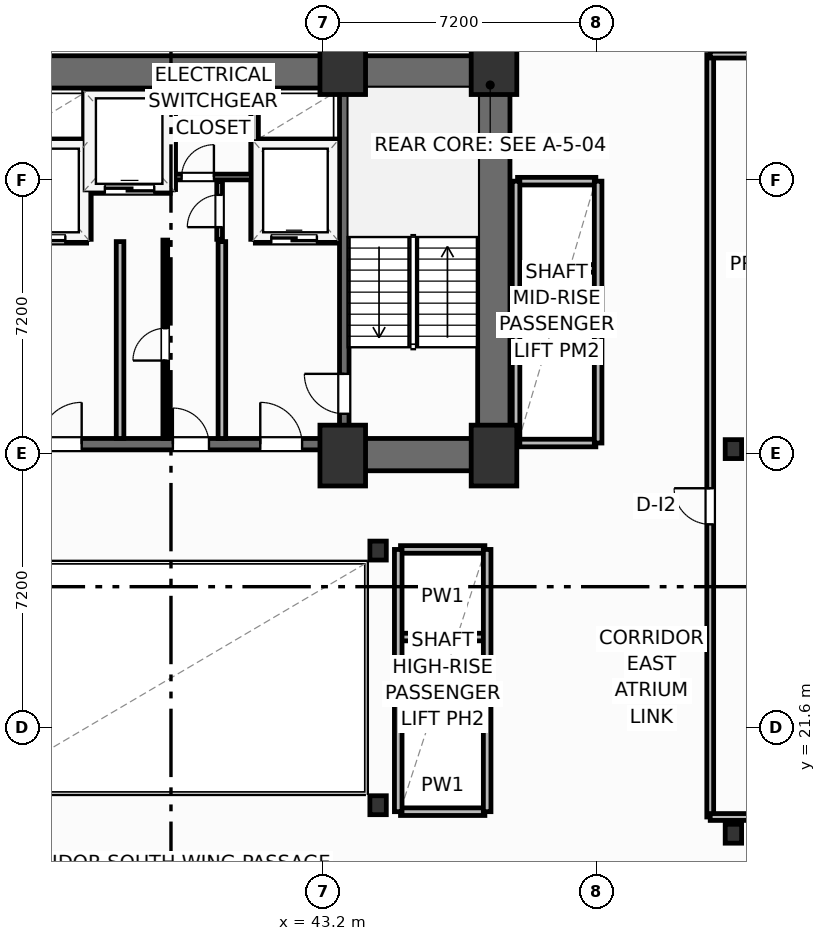
"""IFC4 building model, lengths in metres.
Left out: names, types, materials, properties, quantities, classifications, styles, units other than length and angle.
Written with IfcOpenShell. Run it as: python <this file> out.ifc"""

import sys

from ifc_helpers import new_model, si_unit, direction, frame, frame_2d, origin, origin_2d, place, context, subcontext, project, spatial, rectangle, i_section, extrude, element, fill, save


model = new_model("IFC4")
c1 = context("Model", 3, precision=1e-05, world=origin(), true_north=direction((0.0, 1.0)))
c2 = subcontext(c1, "Body", "Model", "MODEL_VIEW")
j1 = project(units=[si_unit("LENGTHUNIT", "METRE"), si_unit("PLANEANGLEUNIT", "RADIAN")], contexts=[c1])
p1 = place(None, origin())
s1 = spatial("IfcSite", under=j1, at=p1, CompositionType="ELEMENT")
p2 = place(p1, origin())
s2 = spatial("IfcBuilding", under=s1, at=p2, CompositionType="ELEMENT")
p3 = place(p2, frame((0.0, 0.0, 49.2)))
s3 = spatial("IfcBuildingStorey", under=s2, at=p3, CompositionType="ELEMENT", Elevation=49.2)
for number, where, z_axis, x_axis in (
    (1, (43.72, 28.75, 0.0), (0.0, 0.0, 1.0), (1.0, 0.0, 0.0)),
    (2, (47.7, 28.75, 0.0), (0.0, 0.0, 1.0), (1.0, 0.0, 0.0)),
    (3, (43.72, 39.05, 0.0), (0.0, 0.0, 1.0), (1.0, 0.0, 0.0)),
    (4, (47.7, 39.05, 0.0), (0.0, 0.0, 1.0), (1.0, 0.0, 0.0)),
):
    element("IfcColumn", number, at=place(p3, frame(where, z_axis=z_axis, x_axis=x_axis)), inside=s3, PredefinedType="COLUMN", context=c2, shape_type="SweptSolid", body=[
        extrude(rectangle(XDim=1.2, YDim=1.6, at=origin_2d()), origin(), (0.0, 0.0, 1.0), 3.7),
    ])
for number, where, z_axis, x_axis in (
    (5, (44.65, 19.55, 0.0), (0.0, 0.0, 1.0), (1.0, 0.0, 0.0)),
    (6, (44.65, 26.25, 0.0), (0.0, 0.0, 1.0), (1.0, 0.0, 0.0)),
    (7, (54.0, 18.8, 0.0), (0.0, 0.0, 1.0), (1.0, 0.0, 0.0)),
    (8, (54.0, 28.92, 0.0), (0.0, 0.0, 1.0), (1.0, 0.0, 0.0)),
):
    element("IfcColumn", number, at=place(p3, frame(where, z_axis=z_axis, x_axis=x_axis)), inside=s3, PredefinedType="COLUMN", context=c2, shape_type="SweptSolid", body=[
        extrude(i_section(OverallWidth=0.432, OverallDepth=0.498, WebThickness=0.056, FlangeThickness=0.089, FilletRadius=0.025, at=origin_2d()), origin(), (0.0, 0.0, 1.0), 3.7),
    ])
p4 = place(p3, frame((30.28, 38.845, 0.0), z_axis=(0.0, 0.0, 1.0), x_axis=(1.0, 0.0, 0.0)))
e9 = element("IfcWall", 9, at=p4, inside=s3, PredefinedType="SHEAR", context=c2, shape_type="SweptSolid", body=[
    extrude(rectangle(XDim=17.84, YDim=0.85, at=frame_2d((8.92, 0.0))), origin(), (0.0, 0.0, 1.0), 3.45),
])
p5 = place(p3, frame((47.695, 29.2, 0.0), z_axis=(0.0, 0.0, 1.0), x_axis=(0.0, 1.0, 0.0)))
e10 = element("IfcWall", 10, at=p5, inside=s3, PredefinedType="SHEAR", context=c2, shape_type="SweptSolid", body=[
    extrude(rectangle(XDim=9.22, YDim=0.85, at=frame_2d((4.61, 0.0))), origin(), (0.0, 0.0, 1.0), 3.45),
])
p6 = place(p3, frame((43.6, 28.775, 0.0), z_axis=(0.0, 0.0, 1.0), x_axis=(1.0, 0.0, 0.0)))
e11 = element("IfcWall", 11, at=p6, inside=s3, PredefinedType="SHEAR", context=c2, shape_type="SweptSolid", body=[
    extrude(rectangle(XDim=4.52, YDim=0.85, at=frame_2d((2.26, 0.0))), origin(), (0.0, 0.0, 1.0), 3.45),
])
p7 = place(p3, frame((34.8, 29.05, 0.0), z_axis=(0.0, 0.0, 1.0), x_axis=(1.0, 0.0, 0.0)))
e12 = element("IfcWall", 12, at=p7, inside=s3, PredefinedType="SHEAR", context=c2, shape_type="SweptSolid", body=[
    extrude(rectangle(XDim=8.8, YDim=0.3, at=frame_2d((4.4, 0.0))), origin(), (0.0, 0.0, 1.0), 3.45),
])
p8 = place(p7, frame((0.95, 0.0, 0.0)))
e13 = element("IfcOpeningElement", 13, at=p8, cuts=e12, PredefinedType="OPENING", context=c2, shape_type="SweptSolid", body=[
    extrude(rectangle(XDim=1.1, YDim=2.15, at=frame_2d((0.55, 1.075))), frame((0.0, 0.16, 0.0), z_axis=(0.0, -1.0, 0.0), x_axis=(1.0, 0.0, 0.0)), (0.0, 0.0, 1.0), 0.32),
])
p9 = place(p7, frame((6.75, 0.0, 0.0)))
e14 = element("IfcOpeningElement", 14, at=p9, cuts=e12, PredefinedType="OPENING", context=c2, shape_type="SweptSolid", body=[
    extrude(rectangle(XDim=1.1, YDim=2.15, at=frame_2d((0.55, 1.075))), frame((0.0, 0.16, 0.0), z_axis=(0.0, -1.0, 0.0), x_axis=(1.0, 0.0, 0.0)), (0.0, 0.0, 1.0), 0.32),
])
p10 = place(p7, frame((4.45, 0.0, 0.0)))
e15 = element("IfcOpeningElement", 15, at=p10, cuts=e12, PredefinedType="OPENING", context=c2, shape_type="SweptSolid", body=[
    extrude(rectangle(XDim=0.95, YDim=2.15, at=frame_2d((0.475, 1.075))), frame((0.0, 0.16, 0.0), z_axis=(0.0, -1.0, 0.0), x_axis=(1.0, 0.0, 0.0)), (0.0, 0.0, 1.0), 0.32),
])
p11 = place(p3, frame((43.76, 29.2, 0.0), z_axis=(0.0, 0.0, 1.0), x_axis=(0.0, 1.0, 0.0)))
e16 = element("IfcWall", 16, at=p11, inside=s3, PredefinedType="SHEAR", context=c2, shape_type="SweptSolid", body=[
    extrude(rectangle(XDim=9.22, YDim=0.25, at=frame_2d((4.61, 0.0))), origin(), (0.0, 0.0, 1.0), 3.45),
])
p12 = place(p11, frame((0.65, 0.0, 0.0)))
e17 = element("IfcOpeningElement", 17, at=p12, cuts=e16, PredefinedType="OPENING", context=c2, shape_type="SweptSolid", body=[
    extrude(rectangle(XDim=1.05, YDim=2.15, at=frame_2d((0.525, 1.075))), frame((0.0, 0.135, 0.0), z_axis=(0.0, -1.0, 0.0), x_axis=(1.0, 0.0, 0.0)), (0.0, 0.0, 1.0), 0.27),
])
p13 = place(p3, frame((53.39, 19.24, 0.0), z_axis=(0.0, 0.0, 1.0), x_axis=(0.0, 1.0, 0.0)))
e18 = element("IfcWall", 18, at=p13, inside=s3, PredefinedType="PARTITIONING", context=c2, shape_type="SweptSolid", body=[
    extrude(rectangle(XDim=20.06, YDim=0.18, at=frame_2d((10.03, 0.0))), origin(), (0.0, 0.0, 1.0), 3.45),
])
p14 = place(p13, frame((7.7, 0.0, 0.0)))
e19 = element("IfcOpeningElement", 19, at=p14, cuts=e18, PredefinedType="OPENING", context=c2, shape_type="SweptSolid", body=[
    extrude(rectangle(XDim=0.95, YDim=2.05, at=frame_2d((0.475, 1.025))), frame((0.0, 0.1, 0.0), z_axis=(0.0, -1.0, 0.0), x_axis=(1.0, 0.0, 0.0)), (0.0, 0.0, 1.0), 0.2),
])
p15 = place(p3, frame((53.39, 19.24, 0.0), z_axis=(0.0, 0.0, 1.0), x_axis=(1.0, 0.0, 0.0)))
e20 = element("IfcWall", 20, at=p15, inside=s3, PredefinedType="PARTITIONING", context=c2, shape_type="SweptSolid", body=[
    extrude(rectangle(XDim=23.61, YDim=0.18, at=frame_2d((11.805, 0.0))), origin(), (0.0, 0.0, 1.0), 3.45),
])
p16 = place(p3, frame((53.39, 39.3, 0.0), z_axis=(0.0, 0.0, 1.0), x_axis=(1.0, 0.0, 0.0)))
e21 = element("IfcWall", 21, at=p16, inside=s3, PredefinedType="PARTITIONING", context=c2, shape_type="SweptSolid", body=[
    extrude(rectangle(XDim=6.136, YDim=0.18, at=frame_2d((3.068, 0.0))), origin(), (0.0, 0.0, 1.0), 3.45),
])
for number, where, z_axis, x_axis in (
    (22, (37.86, 29.2, 0.0), (0.0, 0.0, 1.0), (0.0, 1.0, 0.0)),
    (23, (40.54, 29.2, 0.0), (0.0, 0.0, 1.0), (0.0, 1.0, 0.0)),
):
    element("IfcWall", number, at=place(p3, frame(where, z_axis=z_axis, x_axis=x_axis)), inside=s3, PredefinedType="PARTITIONING", context=c2, shape_type="SweptSolid", body=[
        extrude(rectangle(XDim=5.18, YDim=0.2, at=frame_2d((2.59, 0.0))), origin(), (0.0, 0.0, 1.0), 3.45),
    ])
p17 = place(p3, frame((34.8, 34.44, 0.0), z_axis=(0.0, 0.0, 1.0), x_axis=(1.0, 0.0, 0.0)))
e24 = element("IfcWall", 24, at=p17, inside=s3, PredefinedType="PARTITIONING", context=c2, shape_type="SweptSolid", body=[
    extrude(rectangle(XDim=2.18, YDim=0.2, at=frame_2d((1.09, 0.0))), origin(), (0.0, 0.0, 1.0), 3.45),
])
p18 = place(p17, frame((0.42, 0.0, 0.0)))
e25 = element("IfcOpeningElement", 25, at=p18, cuts=e24, PredefinedType="OPENING", context=c2, shape_type="SweptSolid", body=[
    extrude(rectangle(XDim=1.2, YDim=2.2, at=frame_2d((0.6, 1.1))), frame((0.0, 0.11, 0.0), z_axis=(0.0, -1.0, 0.0), x_axis=(1.0, 0.0, 0.0)), (0.0, 0.0, 1.0), 0.22),
])
p19 = place(p3, frame((34.8, 36.98, 0.0), z_axis=(0.0, 0.0, 1.0), x_axis=(1.0, 0.0, 0.0)))
e26 = element("IfcWall", 26, at=p19, inside=s3, PredefinedType="PARTITIONING", context=c2, shape_type="SweptSolid", body=[
    extrude(rectangle(XDim=2.18, YDim=0.2, at=frame_2d((1.09, 0.0))), origin(), (0.0, 0.0, 1.0), 3.45),
])
p20 = place(p3, frame((37.0, 34.44, 0.0), z_axis=(0.0, 0.0, 1.0), x_axis=(0.0, 1.0, 0.0)))
e27 = element("IfcWall", 27, at=p20, inside=s3, PredefinedType="PARTITIONING", context=c2, shape_type="SweptSolid", body=[
    extrude(rectangle(XDim=3.9, YDim=0.2, at=frame_2d((1.95, 0.0))), origin(), (0.0, 0.0, 1.0), 3.45),
])
p21 = place(p3, frame((41.42, 34.44, 0.0), z_axis=(0.0, 0.0, 1.0), x_axis=(1.0, 0.0, 0.0)))
e28 = element("IfcWall", 28, at=p21, inside=s3, PredefinedType="PARTITIONING", context=c2, shape_type="SweptSolid", body=[
    extrude(rectangle(XDim=2.18, YDim=0.2, at=frame_2d((1.09, 0.0))), origin(), (0.0, 0.0, 1.0), 3.45),
])
p22 = place(p21, frame((0.42, 0.0, 0.0)))
e29 = element("IfcOpeningElement", 29, at=p22, cuts=e28, PredefinedType="OPENING", context=c2, shape_type="SweptSolid", body=[
    extrude(rectangle(XDim=1.2, YDim=2.2, at=frame_2d((0.6, 1.1))), frame((0.0, 0.11, 0.0), z_axis=(0.0, -1.0, 0.0), x_axis=(1.0, 0.0, 0.0)), (0.0, 0.0, 1.0), 0.22),
])
p23 = place(p3, frame((41.42, 36.98, 0.0), z_axis=(0.0, 0.0, 1.0), x_axis=(1.0, 0.0, 0.0)))
e30 = element("IfcWall", 30, at=p23, inside=s3, PredefinedType="PARTITIONING", context=c2, shape_type="SweptSolid", body=[
    extrude(rectangle(XDim=2.18, YDim=0.2, at=frame_2d((1.09, 0.0))), origin(), (0.0, 0.0, 1.0), 3.45),
])
p24 = place(p3, frame((41.4, 34.44, 0.0), z_axis=(0.0, 0.0, 1.0), x_axis=(0.0, 1.0, 0.0)))
e31 = element("IfcWall", 31, at=p24, inside=s3, PredefinedType="PARTITIONING", context=c2, shape_type="SweptSolid", body=[
    extrude(rectangle(XDim=3.9, YDim=0.2, at=frame_2d((1.95, 0.0))), origin(), (0.0, 0.0, 1.0), 3.45),
])
p25 = place(p3, frame((37.06, 35.75, 0.0), z_axis=(0.0, 0.0, 1.0), x_axis=(1.0, 0.0, 0.0)))
e32 = element("IfcWall", 32, at=p25, inside=s3, PredefinedType="PARTITIONING", context=c2, shape_type="SweptSolid", body=[
    extrude(rectangle(XDim=2.12, YDim=0.2, at=frame_2d((1.06, 0.0))), origin(), (0.0, 0.0, 1.0), 3.45),
])
p26 = place(p25, frame((0.4, 0.0, 0.0)))
e33 = element("IfcOpeningElement", 33, at=p26, cuts=e32, PredefinedType="OPENING", context=c2, shape_type="SweptSolid", body=[
    extrude(rectangle(XDim=1.3, YDim=2.2, at=frame_2d((0.65, 1.1))), frame((0.0, 0.11, 0.0), z_axis=(0.0, -1.0, 0.0), x_axis=(1.0, 0.0, 0.0)), (0.0, 0.0, 1.0), 0.22),
])
p27 = place(p3, frame((39.22, 35.75, 0.0), z_axis=(0.0, 0.0, 1.0), x_axis=(0.0, 1.0, 0.0)))
e34 = element("IfcWall", 34, at=p27, inside=s3, PredefinedType="PARTITIONING", context=c2, shape_type="SweptSolid", body=[
    extrude(rectangle(XDim=2.59, YDim=0.2, at=frame_2d((1.295, 0.0))), origin(), (0.0, 0.0, 1.0), 3.45),
])
p28 = place(p3, frame((39.3, 36.08, 0.0), z_axis=(0.0, 0.0, 1.0), x_axis=(1.0, 0.0, 0.0)))
e35 = element("IfcWall", 35, at=p28, inside=s3, PredefinedType="PARTITIONING", context=c2, shape_type="SweptSolid", body=[
    extrude(rectangle(XDim=2.02, YDim=0.15, at=frame_2d((1.01, 0.0))), origin(), (0.0, 0.0, 1.0), 3.45),
])
p29 = place(p28, frame((0.18, 0.0, 0.0)))
e36 = element("IfcOpeningElement", 36, at=p29, cuts=e35, PredefinedType="OPENING", context=c2, shape_type="SweptSolid", body=[
    extrude(rectangle(XDim=0.85, YDim=2.05, at=frame_2d((0.425, 1.025))), frame((0.0, 0.085, 0.0), z_axis=(0.0, -1.0, 0.0), x_axis=(1.0, 0.0, 0.0)), (0.0, 0.0, 1.0), 0.17),
])
p30 = place(p3, frame((40.48, 34.44, 0.0), z_axis=(0.0, 0.0, 1.0), x_axis=(0.0, 1.0, 0.0)))
e37 = element("IfcWall", 37, at=p30, inside=s3, PredefinedType="PARTITIONING", context=c2, shape_type="SweptSolid", body=[
    extrude(rectangle(XDim=1.52, YDim=0.15, at=frame_2d((0.76, 0.0))), origin(), (0.0, 0.0, 1.0), 3.45),
])
p31 = place(p30, frame((0.32, 0.0, 0.0)))
e38 = element("IfcOpeningElement", 38, at=p31, cuts=e37, PredefinedType="OPENING", context=c2, shape_type="SweptSolid", body=[
    extrude(rectangle(XDim=0.85, YDim=2.05, at=frame_2d((0.425, 1.025))), frame((0.0, 0.085, 0.0), z_axis=(0.0, -1.0, 0.0), x_axis=(1.0, 0.0, 0.0)), (0.0, 0.0, 1.0), 0.17),
])
p32 = place(p3, frame((39.05, 29.2, 0.0), z_axis=(0.0, 0.0, 1.0), x_axis=(0.0, 1.0, 0.0)))
e39 = element("IfcWall", 39, at=p32, inside=s3, PredefinedType="PARTITIONING", context=c2, shape_type="SweptSolid", body=[
    extrude(rectangle(XDim=5.22, YDim=0.125, at=frame_2d((2.61, 0.0))), origin(), (0.0, 0.0, 1.0), 3.45),
])
p33 = place(p32, frame((2.05, 0.0, 0.0)))
e40 = element("IfcOpeningElement", 40, at=p33, cuts=e39, PredefinedType="OPENING", context=c2, shape_type="SweptSolid", body=[
    extrude(rectangle(XDim=0.85, YDim=2.05, at=frame_2d((0.425, 1.025))), frame((0.0, 0.073, 0.0), z_axis=(0.0, -1.0, 0.0), x_axis=(1.0, 0.0, 0.0)), (0.0, 0.0, 1.0), 0.145),
])
for number, where, z_axis, x_axis in (
    (41, (48.32, 31.375, 0.0), (0.0, 0.0, 1.0), (1.0, 0.0, 0.0)),
    (42, (48.32, 33.675, 0.0), (0.0, 0.0, 1.0), (1.0, 0.0, 0.0)),
):
    element("IfcWall", number, at=place(p3, frame(where, z_axis=z_axis, x_axis=x_axis)), inside=s3, PredefinedType="PARTITIONING", context=c2, shape_type="SweptSolid", body=[
        extrude(rectangle(XDim=2.06, YDim=0.2, at=frame_2d((1.03, 0.0))), origin(), (0.0, 0.0, 1.0), 3.45),
    ])
p34 = place(p3, frame((48.32, 29.08, 0.0), z_axis=(0.0, 0.0, 1.0), x_axis=(1.0, 0.0, 0.0)))
e43 = element("IfcWall", 43, at=p34, inside=s3, PredefinedType="PARTITIONING", context=c2, shape_type="SweptSolid", body=[
    extrude(rectangle(XDim=2.06, YDim=0.2, at=frame_2d((1.03, 0.0))), origin(), (0.0, 0.0, 1.0), 2.662),
])
p35 = place(p3, frame((48.32, 35.97, 0.0), z_axis=(0.0, 0.0, 1.0), x_axis=(1.0, 0.0, 0.0)))
e44 = element("IfcWall", 44, at=p35, inside=s3, PredefinedType="PARTITIONING", context=c2, shape_type="SweptSolid", body=[
    extrude(rectangle(XDim=2.06, YDim=0.2, at=frame_2d((1.03, 0.0))), origin(), (0.0, 0.0, 1.0), 3.45),
])
for number, where, z_axis, x_axis in (
    (45, (48.28, 29.08, 0.0), (0.0, 0.0, 1.0), (0.0, 1.0, 0.0)),
    (46, (50.44, 29.08, 0.0), (0.0, 0.0, 1.0), (0.0, 1.0, 0.0)),
):
    element("IfcWall", number, at=place(p3, frame(where, z_axis=z_axis, x_axis=x_axis)), inside=s3, PredefinedType="PARTITIONING", context=c2, shape_type="SweptSolid", body=[
        extrude(rectangle(XDim=6.89, YDim=0.2, at=frame_2d((3.445, 0.0))), origin(), (0.0, 0.0, 1.0), 3.45),
    ])
for number, where, z_axis, x_axis in (
    (47, (45.24, 21.675, 0.0), (0.0, 0.0, 1.0), (1.0, 0.0, 0.0)),
    (48, (45.24, 23.975, 0.0), (0.0, 0.0, 1.0), (1.0, 0.0, 0.0)),
):
    element("IfcWall", number, at=place(p3, frame(where, z_axis=z_axis, x_axis=x_axis)), inside=s3, PredefinedType="PARTITIONING", context=c2, shape_type="SweptSolid", body=[
        extrude(rectangle(XDim=2.22, YDim=0.2, at=frame_2d((1.11, 0.0))), origin(), (0.0, 0.0, 1.0), 3.45),
    ])
p36 = place(p3, frame((45.24, 19.38, 0.0), z_axis=(0.0, 0.0, 1.0), x_axis=(1.0, 0.0, 0.0)))
e49 = element("IfcWall", 49, at=p36, inside=s3, PredefinedType="PARTITIONING", context=c2, shape_type="SweptSolid", body=[
    extrude(rectangle(XDim=2.22, YDim=0.2, at=frame_2d((1.11, 0.0))), origin(), (0.0, 0.0, 1.0), 2.662),
])
p37 = place(p3, frame((45.24, 26.28, 0.0), z_axis=(0.0, 0.0, 1.0), x_axis=(1.0, 0.0, 0.0)))
e50 = element("IfcWall", 50, at=p37, inside=s3, PredefinedType="PARTITIONING", context=c2, shape_type="SweptSolid", body=[
    extrude(rectangle(XDim=2.22, YDim=0.2, at=frame_2d((1.11, 0.0))), origin(), (0.0, 0.0, 1.0), 3.45),
])
for number, where, z_axis, x_axis in (
    (51, (45.18, 19.38, 0.0), (0.0, 0.0, 1.0), (0.0, 1.0, 0.0)),
    (52, (47.52, 19.38, 0.0), (0.0, 0.0, 1.0), (0.0, 1.0, 0.0)),
):
    element("IfcWall", number, at=place(p3, frame(where, z_axis=z_axis, x_axis=x_axis)), inside=s3, PredefinedType="PARTITIONING", context=c2, shape_type="SweptSolid", body=[
        extrude(rectangle(XDim=6.9, YDim=0.2, at=frame_2d((3.45, 0.0))), origin(), (0.0, 0.0, 1.0), 3.45),
    ])
p38 = place(p14, origin())
e53 = element("IfcDoor", 53, at=p38, inside=s3, OperationType="SINGLE_SWING_RIGHT", PredefinedType="DOOR", context=c2, shape_type="SweptSolid", body=[
    extrude(rectangle(XDim=0.95, YDim=2.05, at=frame_2d((0.475, 1.025))), frame((0.0, 0.025, 0.0), z_axis=(0.0, -1.0, 0.0), x_axis=(1.0, 0.0, 0.0)), (0.0, 0.0, 1.0), 0.05),
])
fill(e19, e53)
p39 = place(p12, origin())
e54 = element("IfcDoor", 54, at=p39, inside=s3, OperationType="SINGLE_SWING_RIGHT", PredefinedType="DOOR", context=c2, shape_type="SweptSolid", body=[
    extrude(rectangle(XDim=1.05, YDim=2.15, at=frame_2d((0.525, 1.075))), frame((0.0, 0.025, 0.0), z_axis=(0.0, -1.0, 0.0), x_axis=(1.0, 0.0, 0.0)), (0.0, 0.0, 1.0), 0.05),
])
fill(e17, e54)
p40 = place(p8, origin())
e55 = element("IfcDoor", 55, at=p40, inside=s3, OperationType="SINGLE_SWING_RIGHT", PredefinedType="DOOR", context=c2, shape_type="SweptSolid", body=[
    extrude(rectangle(XDim=1.1, YDim=2.15, at=frame_2d((0.55, 1.075))), frame((0.0, 0.025, 0.0), z_axis=(0.0, -1.0, 0.0), x_axis=(1.0, 0.0, 0.0)), (0.0, 0.0, 1.0), 0.05),
])
fill(e13, e55)
p41 = place(p9, origin())
e56 = element("IfcDoor", 56, at=p41, inside=s3, OperationType="SINGLE_SWING_LEFT", PredefinedType="DOOR", context=c2, shape_type="SweptSolid", body=[
    extrude(rectangle(XDim=1.1, YDim=2.15, at=frame_2d((0.55, 1.075))), frame((0.0, 0.025, 0.0), z_axis=(0.0, -1.0, 0.0), x_axis=(1.0, 0.0, 0.0)), (0.0, 0.0, 1.0), 0.05),
])
fill(e14, e56)
p42 = place(p18, origin())
e57 = element("IfcDoor", 57, at=p42, inside=s3, OperationType="SLIDING_TO_LEFT", PredefinedType="DOOR", context=c2, shape_type="SweptSolid", body=[
    extrude(rectangle(XDim=1.2, YDim=2.2, at=frame_2d((0.6, 1.1))), frame((0.0, 0.025, 0.0), z_axis=(0.0, -1.0, 0.0), x_axis=(1.0, 0.0, 0.0)), (0.0, 0.0, 1.0), 0.05),
])
fill(e25, e57)
p43 = place(p22, origin())
e58 = element("IfcDoor", 58, at=p43, inside=s3, OperationType="SLIDING_TO_LEFT", PredefinedType="DOOR", context=c2, shape_type="SweptSolid", body=[
    extrude(rectangle(XDim=1.2, YDim=2.2, at=frame_2d((0.6, 1.1))), frame((0.0, 0.025, 0.0), z_axis=(0.0, -1.0, 0.0), x_axis=(1.0, 0.0, 0.0)), (0.0, 0.0, 1.0), 0.05),
])
fill(e29, e58)
p44 = place(p26, origin())
e59 = element("IfcDoor", 59, at=p44, inside=s3, OperationType="SLIDING_TO_LEFT", PredefinedType="DOOR", context=c2, shape_type="SweptSolid", body=[
    extrude(rectangle(XDim=1.3, YDim=2.2, at=frame_2d((0.65, 1.1))), frame((0.0, 0.025, 0.0), z_axis=(0.0, -1.0, 0.0), x_axis=(1.0, 0.0, 0.0)), (0.0, 0.0, 1.0), 0.05),
])
fill(e33, e59)
p45 = place(p29, origin())
e60 = element("IfcDoor", 60, at=p45, inside=s3, OperationType="SINGLE_SWING_RIGHT", PredefinedType="DOOR", context=c2, shape_type="SweptSolid", body=[
    extrude(rectangle(XDim=0.85, YDim=2.05, at=frame_2d((0.425, 1.025))), frame((0.0, 0.025, 0.0), z_axis=(0.0, -1.0, 0.0), x_axis=(1.0, 0.0, 0.0)), (0.0, 0.0, 1.0), 0.05),
])
fill(e36, e60)
p46 = place(p31, origin())
e61 = element("IfcDoor", 61, at=p46, inside=s3, OperationType="SINGLE_SWING_LEFT", PredefinedType="DOOR", context=c2, shape_type="SweptSolid", body=[
    extrude(rectangle(XDim=0.85, YDim=2.05, at=frame_2d((0.425, 1.025))), frame((0.0, 0.025, 0.0), z_axis=(0.0, -1.0, 0.0), x_axis=(1.0, 0.0, 0.0)), (0.0, 0.0, 1.0), 0.05),
])
fill(e38, e61)
p47 = place(p33, origin())
e62 = element("IfcDoor", 62, at=p47, inside=s3, OperationType="SINGLE_SWING_LEFT", PredefinedType="DOOR", context=c2, shape_type="SweptSolid", body=[
    extrude(rectangle(XDim=0.85, YDim=2.05, at=frame_2d((0.425, 1.025))), frame((0.0, 0.025, 0.0), z_axis=(0.0, -1.0, 0.0), x_axis=(1.0, 0.0, 0.0)), (0.0, 0.0, 1.0), 0.05),
])
fill(e40, e62)
p48 = place(p10, origin())
e63 = element("IfcDoor", 63, at=p48, inside=s3, OperationType="SINGLE_SWING_LEFT", PredefinedType="DOOR", context=c2, shape_type="SweptSolid", body=[
    extrude(rectangle(XDim=0.95, YDim=2.15, at=frame_2d((0.475, 1.075))), frame((0.0, 0.025, 0.0), z_axis=(0.0, -1.0, 0.0), x_axis=(1.0, 0.0, 0.0)), (0.0, 0.0, 1.0), 0.05),
])
fill(e15, e63)
save(model, sys.argv[1])
